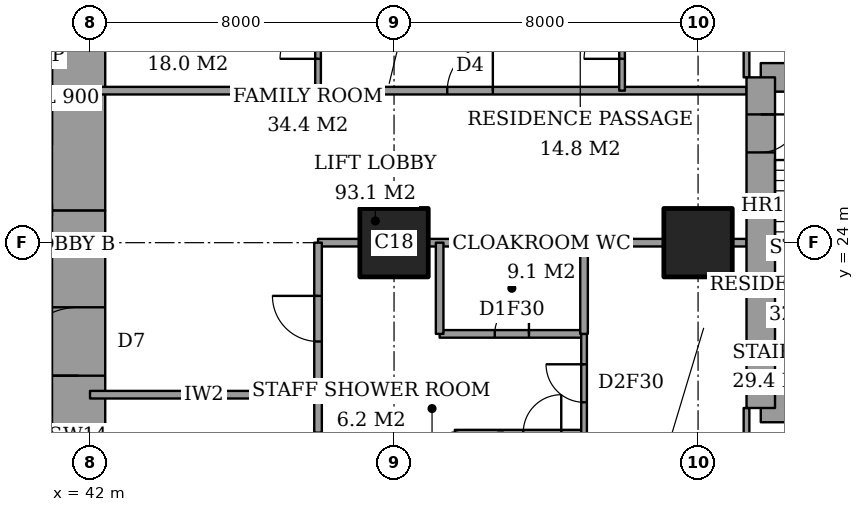
"""IFC4 building model, lengths in metres.
Left out: names, types, materials, properties, quantities, classifications, styles, units other than length and angle.
Written with IfcOpenShell. Run it as: python <this file> out.ifc"""

import sys

from ifc_helpers import new_model, si_unit, direction, frame, frame_2d, origin, origin_2d, place, context, subcontext, project, spatial, rectangle, extrude, element, fill, save


model = new_model("IFC4")
c1 = context("Model", 3, precision=1e-05, world=origin(), true_north=direction((0.0, 1.0)))
c2 = subcontext(c1, "Body", "Model", "MODEL_VIEW")
j1 = project(units=[si_unit("LENGTHUNIT", "METRE"), si_unit("PLANEANGLEUNIT", "RADIAN")], contexts=[c1])
p1 = place(None, origin())
s1 = spatial("IfcSite", under=j1, at=p1, CompositionType="ELEMENT")
p2 = place(p1, origin())
s2 = spatial("IfcBuilding", under=s1, at=p2, CompositionType="ELEMENT")
p3 = place(p2, frame((0.0, 0.0, 193.0)))
s3 = spatial("IfcBuildingStorey", under=s2, at=p3, CompositionType="ELEMENT", Elevation=193.0)
for number, where, z_axis, x_axis in (
    (1, (50.0, 24.0, 0.0), (0.0, 0.0, 1.0), (1.0, 0.0, 0.0)),
    (2, (58.0, 24.0, 0.0), (0.0, 0.0, 1.0), (1.0, 0.0, 0.0)),
):
    element("IfcColumn", number, at=place(p3, frame(where, z_axis=z_axis, x_axis=x_axis)), inside=s3, PredefinedType="COLUMN", context=c2, shape_type="SweptSolid", body=[
        extrude(rectangle(XDim=1.8, YDim=1.8, at=origin_2d()), origin(), (0.0, 0.0, 1.0), 3.6),
    ])
p4 = place(p3, frame((41.7, 13.0, 0.0), z_axis=(0.0, 0.0, 1.0), x_axis=(0.0, 1.0, 0.0)))
e3 = element("IfcWall", 3, at=p4, inside=s3, PredefinedType="SHEAR", context=c2, shape_type="SweptSolid", body=[
    extrude(rectangle(XDim=11.85, YDim=1.4, at=frame_2d((5.925, 0.0))), origin(), (0.0, 0.0, 1.0), 3.6),
])
p5 = place(p4, frame((7.5, 0.0, 0.0)))
e4 = element("IfcOpeningElement", 4, at=p5, cuts=e3, PredefinedType="OPENING", context=c2, shape_type="SweptSolid", body=[
    extrude(rectangle(XDim=1.8, YDim=2.4, at=frame_2d((0.9, 1.2))), frame((0.0, 0.71, 0.0), z_axis=(0.0, -1.0, 0.0), x_axis=(1.0, 0.0, 0.0)), (0.0, 0.0, 1.0), 1.42),
])
p6 = place(p3, frame((41.7, 24.85, 0.0), z_axis=(0.0, 0.0, 1.0), x_axis=(0.0, 1.0, 0.0)))
e5 = element("IfcWall", 5, at=p6, inside=s3, PredefinedType="SHEAR", context=c2, shape_type="SweptSolid", body=[
    extrude(rectangle(XDim=10.15, YDim=1.4, at=frame_2d((5.075, 0.0))), origin(), (0.0, 0.0, 1.0), 3.6),
])
for number, where, z_axis, x_axis in (
    (6, (59.65, 19.65, 0.0), (0.0, 0.0, 1.0), (1.0, 0.0, 0.0)),
    (7, (64.1, 28.35, 0.0), (0.0, 0.0, 1.0), (-1.0, 0.0, 0.0)),
):
    element("IfcWall", number, at=place(p3, frame(where, z_axis=z_axis, x_axis=x_axis)), inside=s3, PredefinedType="SHEAR", context=c2, shape_type="SweptSolid", body=[
        extrude(rectangle(XDim=4.45, YDim=0.75, at=frame_2d((2.225, 0.0))), origin(), (0.0, 0.0, 1.0), 3.6),
    ])
p7 = place(p3, frame((59.65, 28.35, 0.0), z_axis=(0.0, 0.0, 1.0), x_axis=(0.0, -1.0, 0.0)))
e8 = element("IfcWall", 8, at=p7, inside=s3, PredefinedType="SHEAR", context=c2, shape_type="SweptSolid", body=[
    extrude(rectangle(XDim=8.7, YDim=0.75, at=frame_2d((4.35, 0.0))), origin(), (0.0, 0.0, 1.0), 3.6),
])
p8 = place(p7, frame((0.975, 0.0, 0.0)))
e9 = element("IfcOpeningElement", 9, at=p8, cuts=e8, PredefinedType="OPENING", context=c2, shape_type="SweptSolid", body=[
    extrude(rectangle(XDim=1.0, YDim=2.1, at=frame_2d((0.5, 1.05))), frame((0.0, 0.385, 0.0), z_axis=(0.0, -1.0, 0.0), x_axis=(1.0, 0.0, 0.0)), (0.0, 0.0, 1.0), 0.77),
])
p9 = place(p3, frame((51.6, 19.0, 0.0), z_axis=(0.0, 0.0, 1.0), x_axis=(1.0, 0.0, 0.0)))
e10 = element("IfcWall", 10, at=p9, inside=s3, PredefinedType="PARTITIONING", context=c2, shape_type="SweptSolid", body=[
    extrude(rectangle(XDim=3.4, YDim=0.15, at=frame_2d((1.7, 0.0))), origin(), (0.0, 0.0, 1.0), 3.35),
])
p10 = place(p9, frame((1.8, 0.0, 0.0)))
e11 = element("IfcOpeningElement", 11, at=p10, cuts=e10, PredefinedType="OPENING", context=c2, shape_type="SweptSolid", body=[
    extrude(rectangle(XDim=1.0, YDim=2.1, at=frame_2d((0.5, 1.05))), frame((0.0, 0.085, 0.0), z_axis=(0.0, -1.0, 0.0), x_axis=(1.0, 0.0, 0.0)), (0.0, 0.0, 1.0), 0.17),
])
p11 = place(p3, frame((42.0, 20.0, 0.0), z_axis=(0.0, 0.0, 1.0), x_axis=(1.0, 0.0, 0.0)))
e12 = element("IfcWall", 12, at=p11, inside=s3, PredefinedType="PARTITIONING", context=c2, shape_type="SweptSolid", body=[
    extrude(rectangle(XDim=6.0, YDim=0.2, at=frame_2d((3.0, 0.0))), origin(), (0.0, 0.0, 1.0), 3.35),
])
p12 = place(p3, frame((51.2, 21.6, 0.0), z_axis=(0.0, 0.0, 1.0), x_axis=(1.0, 0.0, 0.0)))
e13 = element("IfcWall", 13, at=p12, inside=s3, PredefinedType="PARTITIONING", context=c2, shape_type="SweptSolid", body=[
    extrude(rectangle(XDim=3.8, YDim=0.2, at=frame_2d((1.9, 0.0))), origin(), (0.0, 0.0, 1.0), 3.35),
])
p13 = place(p12, frame((1.45, 0.0, 0.0)))
e14 = element("IfcOpeningElement", 14, at=p13, cuts=e13, PredefinedType="OPENING", context=c2, shape_type="SweptSolid", body=[
    extrude(rectangle(XDim=0.9, YDim=2.1, at=frame_2d((0.45, 1.05))), frame((0.0, 0.11, 0.0), z_axis=(0.0, -1.0, 0.0), x_axis=(1.0, 0.0, 0.0)), (0.0, 0.0, 1.0), 0.22),
])
p14 = place(p3, frame((48.0, 24.0, 0.0), z_axis=(0.0, 0.0, 1.0), x_axis=(1.0, 0.0, 0.0)))
e15 = element("IfcWall", 15, at=p14, inside=s3, PredefinedType="PARTITIONING", context=c2, shape_type="SweptSolid", body=[
    extrude(rectangle(XDim=1.1, YDim=0.2, at=frame_2d((0.55, 0.0))), origin(), (0.0, 0.0, 1.0), 3.35),
])
p15 = place(p3, frame((50.9, 24.0, 0.0), z_axis=(0.0, 0.0, 1.0), x_axis=(1.0, 0.0, 0.0)))
e16 = element("IfcWall", 16, at=p15, inside=s3, PredefinedType="PARTITIONING", context=c2, shape_type="SweptSolid", body=[
    extrude(rectangle(XDim=6.2, YDim=0.2, at=frame_2d((3.1, 0.0))), origin(), (0.0, 0.0, 1.0), 3.35),
])
p16 = place(p3, frame((58.9, 24.0, 0.0), z_axis=(0.0, 0.0, 1.0), x_axis=(1.0, 0.0, 0.0)))
e17 = element("IfcWall", 17, at=p16, inside=s3, PredefinedType="PARTITIONING", context=c2, shape_type="SweptSolid", body=[
    extrude(rectangle(XDim=0.375, YDim=0.2, at=frame_2d((0.188, 0.0))), origin(), (0.0, 0.0, 1.0), 3.35),
])
p17 = place(p3, frame((42.0, 28.0, 0.0), z_axis=(0.0, 0.0, 1.0), x_axis=(1.0, 0.0, 0.0)))
e18 = element("IfcWall", 18, at=p17, inside=s3, PredefinedType="PARTITIONING", context=c2, shape_type="SweptSolid", body=[
    extrude(rectangle(XDim=17.275, YDim=0.2, at=frame_2d((8.637, 0.0))), origin(), (0.0, 0.0, 1.0), 3.35),
])
p18 = place(p17, frame((9.4, 0.0, 0.0)))
e19 = element("IfcOpeningElement", 19, at=p18, cuts=e18, PredefinedType="OPENING", context=c2, shape_type="SweptSolid", body=[
    extrude(rectangle(XDim=1.2, YDim=2.4, at=frame_2d((0.6, 1.2))), frame((0.0, 0.11, 0.0), z_axis=(0.0, -1.0, 0.0), x_axis=(1.0, 0.0, 0.0)), (0.0, 0.0, 1.0), 0.22),
])
p19 = place(p3, frame((48.0, 19.0, 0.0), z_axis=(0.0, 0.0, 1.0), x_axis=(0.0, 1.0, 0.0)))
e20 = element("IfcWall", 20, at=p19, inside=s3, PredefinedType="PARTITIONING", context=c2, shape_type="SweptSolid", body=[
    extrude(rectangle(XDim=5.0, YDim=0.2, at=frame_2d((2.5, 0.0))), origin(), (0.0, 0.0, 1.0), 3.35),
])
p20 = place(p19, frame((2.4, 0.0, 0.0)))
e21 = element("IfcOpeningElement", 21, at=p20, cuts=e20, PredefinedType="OPENING", context=c2, shape_type="SweptSolid", body=[
    extrude(rectangle(XDim=1.2, YDim=2.4, at=frame_2d((0.6, 1.2))), frame((0.0, 0.11, 0.0), z_axis=(0.0, -1.0, 0.0), x_axis=(1.0, 0.0, 0.0)), (0.0, 0.0, 1.0), 0.22),
])
p21 = place(p3, frame((48.0, 28.0, 0.0), z_axis=(0.0, 0.0, 1.0), x_axis=(0.0, 1.0, 0.0)))
e22 = element("IfcWall", 22, at=p21, inside=s3, PredefinedType="PARTITIONING", context=c2, shape_type="SweptSolid", body=[
    extrude(rectangle(XDim=9.4, YDim=0.15, at=frame_2d((4.7, 0.0))), origin(), (0.0, 0.0, 1.0), 3.35),
])
p22 = place(p21, frame((0.837, 0.0, 0.0)))
e23 = element("IfcOpeningElement", 23, at=p22, cuts=e22, PredefinedType="OPENING", context=c2, shape_type="SweptSolid", body=[
    extrude(rectangle(XDim=1.0, YDim=2.1, at=frame_2d((0.5, 1.05))), frame((0.0, 0.085, 0.0), z_axis=(0.0, -1.0, 0.0), x_axis=(1.0, 0.0, 0.0)), (0.0, 0.0, 1.0), 0.17),
])
p23 = place(p3, frame((51.2, 21.6, 0.0), z_axis=(0.0, 0.0, 1.0), x_axis=(0.0, 1.0, 0.0)))
e24 = element("IfcWall", 24, at=p23, inside=s3, PredefinedType="PARTITIONING", context=c2, shape_type="SweptSolid", body=[
    extrude(rectangle(XDim=2.4, YDim=0.2, at=frame_2d((1.2, 0.0))), origin(), (0.0, 0.0, 1.0), 3.35),
])
p24 = place(p3, frame((51.6, 16.05, 0.0), z_axis=(0.0, 0.0, 1.0), x_axis=(0.0, 1.0, 0.0)))
e25 = element("IfcWall", 25, at=p24, inside=s3, PredefinedType="PARTITIONING", context=c2, shape_type="SweptSolid", body=[
    extrude(rectangle(XDim=2.95, YDim=0.15, at=frame_2d((1.475, 0.0))), origin(), (0.0, 0.0, 1.0), 3.35),
])
p25 = place(p3, frame((55.0, 21.6, 0.0), z_axis=(0.0, 0.0, 1.0), x_axis=(0.0, 1.0, 0.0)))
e26 = element("IfcWall", 26, at=p25, inside=s3, PredefinedType="PARTITIONING", context=c2, shape_type="SweptSolid", body=[
    extrude(rectangle(XDim=2.4, YDim=0.2, at=frame_2d((1.2, 0.0))), origin(), (0.0, 0.0, 1.0), 3.35),
])
p26 = place(p3, frame((55.0, 10.6, 0.0), z_axis=(0.0, 0.0, 1.0), x_axis=(0.0, 1.0, 0.0)))
e27 = element("IfcWall", 27, at=p26, inside=s3, PredefinedType="PARTITIONING", context=c2, shape_type="SweptSolid", body=[
    extrude(rectangle(XDim=11.0, YDim=0.15, at=frame_2d((5.5, 0.0))), origin(), (0.0, 0.0, 1.0), 3.35),
])
p27 = place(p26, frame((9.2, 0.0, 0.0)))
e28 = element("IfcOpeningElement", 28, at=p27, cuts=e27, PredefinedType="OPENING", context=c2, shape_type="SweptSolid", body=[
    extrude(rectangle(XDim=1.0, YDim=2.1, at=frame_2d((0.5, 1.05))), frame((0.0, 0.085, 0.0), z_axis=(0.0, -1.0, 0.0), x_axis=(1.0, 0.0, 0.0)), (0.0, 0.0, 1.0), 0.17),
])
p28 = place(p3, frame((56.0, 28.0, 0.0), z_axis=(0.0, 0.0, 1.0), x_axis=(0.0, 1.0, 0.0)))
e29 = element("IfcWall", 29, at=p28, inside=s3, PredefinedType="PARTITIONING", context=c2, shape_type="SweptSolid", body=[
    extrude(rectangle(XDim=9.4, YDim=0.15, at=frame_2d((4.7, 0.0))), origin(), (0.0, 0.0, 1.0), 3.35),
])
p29 = place(p28, frame((0.837, 0.0, 0.0)))
e30 = element("IfcOpeningElement", 30, at=p29, cuts=e29, PredefinedType="OPENING", context=c2, shape_type="SweptSolid", body=[
    extrude(rectangle(XDim=1.0, YDim=2.1, at=frame_2d((0.5, 1.05))), frame((0.0, 0.085, 0.0), z_axis=(0.0, -1.0, 0.0), x_axis=(1.0, 0.0, 0.0)), (0.0, 0.0, 1.0), 0.17),
])
p30 = place(p3, frame((59.275, 17.2, 0.0), z_axis=(0.0, 0.0, 1.0), x_axis=(0.0, 1.0, 0.0)))
e31 = element("IfcWall", 31, at=p30, inside=s3, PredefinedType="PARTITIONING", context=c2, shape_type="SweptSolid", body=[
    extrude(rectangle(XDim=2.45, YDim=0.15, at=frame_2d((1.225, 0.0))), origin(), (0.0, 0.0, 1.0), 3.35),
])
p31 = place(p30, frame((0.538, 0.0, 0.0)))
e32 = element("IfcOpeningElement", 32, at=p31, cuts=e31, PredefinedType="OPENING", context=c2, shape_type="SweptSolid", body=[
    extrude(rectangle(XDim=1.0, YDim=2.1, at=frame_2d((0.5, 1.05))), frame((0.0, 0.085, 0.0), z_axis=(0.0, -1.0, 0.0), x_axis=(1.0, 0.0, 0.0)), (0.0, 0.0, 1.0), 0.17),
])
p32 = place(p3, frame((59.275, 28.35, 0.0), z_axis=(0.0, 0.0, 1.0), x_axis=(0.0, 1.0, 0.0)))
e33 = element("IfcWall", 33, at=p32, inside=s3, PredefinedType="PARTITIONING", context=c2, shape_type="SweptSolid", body=[
    extrude(rectangle(XDim=2.45, YDim=0.15, at=frame_2d((1.225, 0.0))), origin(), (0.0, 0.0, 1.0), 3.35),
])
p33 = place(p32, frame((0.962, 0.0, 0.0)))
e34 = element("IfcOpeningElement", 34, at=p33, cuts=e33, PredefinedType="OPENING", context=c2, shape_type="SweptSolid", body=[
    extrude(rectangle(XDim=0.9, YDim=2.1, at=frame_2d((0.45, 1.05))), frame((0.0, 0.085, 0.0), z_axis=(0.0, -1.0, 0.0), x_axis=(1.0, 0.0, 0.0)), (0.0, 0.0, 1.0), 0.17),
])
p34 = place(p27, origin())
e35 = element("IfcDoor", 35, at=p34, inside=s3, OperationType="SINGLE_SWING_LEFT", PredefinedType="DOOR", context=c2, shape_type="SweptSolid", body=[
    extrude(rectangle(XDim=1.0, YDim=2.1, at=frame_2d((0.5, 1.05))), frame((0.0, 0.025, 0.0), z_axis=(0.0, -1.0, 0.0), x_axis=(1.0, 0.0, 0.0)), (0.0, 0.0, 1.0), 0.05),
])
fill(e28, e35)
p35 = place(p13, origin())
e36 = element("IfcDoor", 36, at=p35, inside=s3, OperationType="SINGLE_SWING_LEFT", PredefinedType="DOOR", context=c2, shape_type="SweptSolid", body=[
    extrude(rectangle(XDim=0.9, YDim=2.1, at=frame_2d((0.45, 1.05))), frame((0.0, 0.025, 0.0), z_axis=(0.0, -1.0, 0.0), x_axis=(1.0, 0.0, 0.0)), (0.0, 0.0, 1.0), 0.05),
])
fill(e14, e36)
p36 = place(p20, origin())
e37 = element("IfcDoor", 37, at=p36, inside=s3, OperationType="SINGLE_SWING_LEFT", PredefinedType="DOOR", context=c2, shape_type="SweptSolid", body=[
    extrude(rectangle(XDim=1.2, YDim=2.4, at=frame_2d((0.6, 1.2))), frame((0.0, 0.025, 0.0), z_axis=(0.0, -1.0, 0.0), x_axis=(1.0, 0.0, 0.0)), (0.0, 0.0, 1.0), 0.05),
])
fill(e21, e37)
p37 = place(p10, origin())
e38 = element("IfcDoor", 38, at=p37, inside=s3, OperationType="SINGLE_SWING_LEFT", PredefinedType="DOOR", context=c2, shape_type="SweptSolid", body=[
    extrude(rectangle(XDim=1.0, YDim=2.1, at=frame_2d((0.5, 1.05))), frame((0.0, 0.025, 0.0), z_axis=(0.0, -1.0, 0.0), x_axis=(1.0, 0.0, 0.0)), (0.0, 0.0, 1.0), 0.05),
])
fill(e11, e38)
p38 = place(p29, origin())
e39 = element("IfcDoor", 39, at=p38, inside=s3, OperationType="SINGLE_SWING_RIGHT", PredefinedType="DOOR", context=c2, shape_type="SweptSolid", body=[
    extrude(rectangle(XDim=1.0, YDim=2.1, at=frame_2d((0.5, 1.05))), frame((0.0, 0.025, 0.0), z_axis=(0.0, -1.0, 0.0), x_axis=(1.0, 0.0, 0.0)), (0.0, 0.0, 1.0), 0.05),
])
fill(e30, e39)
p39 = place(p18, origin())
e40 = element("IfcDoor", 40, at=p39, inside=s3, OperationType="SINGLE_SWING_LEFT", PredefinedType="DOOR", context=c2, shape_type="SweptSolid", body=[
    extrude(rectangle(XDim=1.2, YDim=2.4, at=frame_2d((0.6, 1.2))), frame((0.0, 0.025, 0.0), z_axis=(0.0, -1.0, 0.0), x_axis=(1.0, 0.0, 0.0)), (0.0, 0.0, 1.0), 0.05),
])
fill(e19, e40)
p40 = place(p22, origin())
e41 = element("IfcDoor", 41, at=p40, inside=s3, OperationType="SINGLE_SWING_RIGHT", PredefinedType="DOOR", context=c2, shape_type="SweptSolid", body=[
    extrude(rectangle(XDim=1.0, YDim=2.1, at=frame_2d((0.5, 1.05))), frame((0.0, 0.025, 0.0), z_axis=(0.0, -1.0, 0.0), x_axis=(1.0, 0.0, 0.0)), (0.0, 0.0, 1.0), 0.05),
])
fill(e23, e41)
p41 = place(p5, origin())
e42 = element("IfcDoor", 42, at=p41, inside=s3, OperationType="DOUBLE_DOOR_DOUBLE_SWING", PredefinedType="DOOR", context=c2, shape_type="SweptSolid", body=[
    extrude(rectangle(XDim=1.8, YDim=2.4, at=frame_2d((0.9, 1.2))), frame((0.0, 0.025, 0.0), z_axis=(0.0, -1.0, 0.0), x_axis=(1.0, 0.0, 0.0)), (0.0, 0.0, 1.0), 0.05),
])
fill(e4, e42)
p42 = place(p8, origin())
e43 = element("IfcDoor", 43, at=p42, inside=s3, OperationType="SINGLE_SWING_RIGHT", PredefinedType="DOOR", context=c2, shape_type="SweptSolid", body=[
    extrude(rectangle(XDim=1.0, YDim=2.1, at=frame_2d((0.5, 1.05))), frame((0.0, 0.025, 0.0), z_axis=(0.0, -1.0, 0.0), x_axis=(1.0, 0.0, 0.0)), (0.0, 0.0, 1.0), 0.05),
])
fill(e9, e43)
save(model, sys.argv[1])
